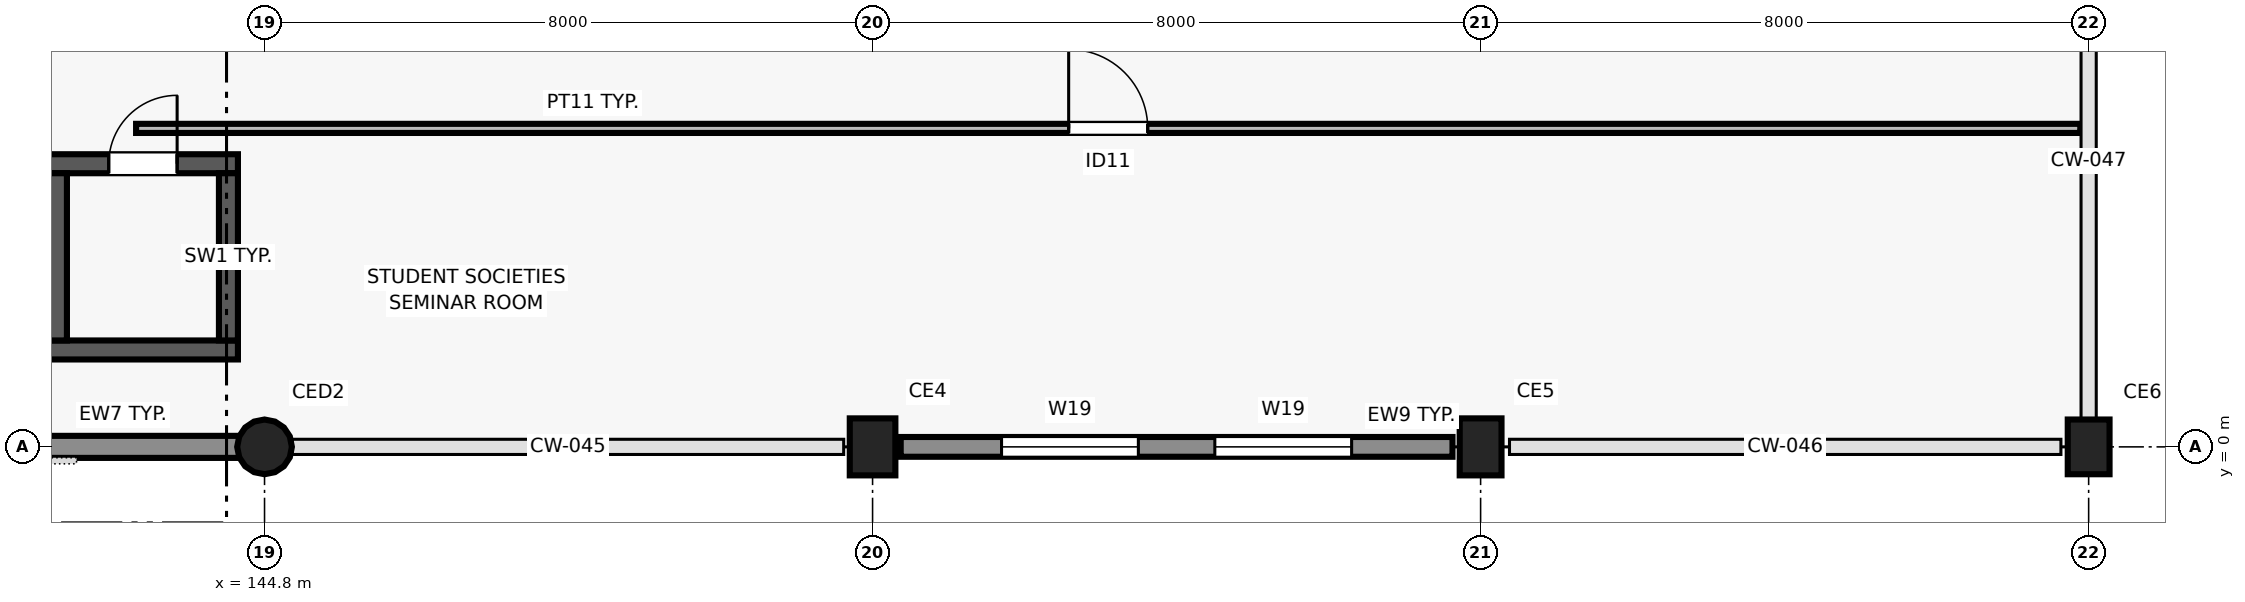
"""IFC4 building model, lengths in metres.
Left out: names, types, materials, properties, quantities, classifications, styles, units other than length and angle.
Written with IfcOpenShell. Run it as: python <this file> out.ifc"""

import sys

from ifc_helpers import new_model, si_unit, direction, frame, frame_2d, origin, origin_2d, place, context, subcontext, project, spatial, rectangle, circle, extrude, element, fill, save


model = new_model("IFC4")
c1 = context("Model", 3, precision=1e-05, world=origin(), true_north=direction((0.0, 1.0)))
c2 = subcontext(c1, "Body", "Model", "MODEL_VIEW")
j1 = project(units=[si_unit("LENGTHUNIT", "METRE"), si_unit("PLANEANGLEUNIT", "RADIAN")], contexts=[c1])
p1 = place(None, origin())
s1 = spatial("IfcSite", under=j1, at=p1, CompositionType="ELEMENT")
p2 = place(p1, origin())
s2 = spatial("IfcBuilding", under=s1, at=p2, CompositionType="ELEMENT")
p3 = place(p2, frame((0.0, 0.0, 4.5)))
s3 = spatial("IfcBuildingStorey", under=s2, at=p3, CompositionType="ELEMENT", Elevation=4.5)
p4 = place(p3, frame((144.8, 0.0, 0.0), z_axis=(0.0, 0.0, 1.0), x_axis=(1.0, 0.0, 0.0)))
e1 = element("IfcColumn", 1, at=p4, inside=s3, PredefinedType="COLUMN", context=c2, shape_type="SweptSolid", body=[
    extrude(circle(Radius=0.36, at=origin_2d()), origin(), (0.0, 0.0, 1.0), 4.5),
])
p5 = place(p3, frame((152.8, 0.0, 0.0), z_axis=(0.0, 0.0, 1.0), x_axis=(1.0, 0.0, 0.0)))
e2 = element("IfcColumn", 2, at=p5, inside=s3, PredefinedType="COLUMN", context=c2, shape_type="SweptSolid", body=[
    extrude(rectangle(XDim=0.75, YDim=0.6, at=origin_2d()), origin(), (0.0, 0.0, 1.0), 4.5),
])
p6 = place(p3, frame((160.8, 0.0, 0.0), z_axis=(0.0, 0.0, 1.0), x_axis=(1.0, 0.0, 0.0)))
e3 = element("IfcColumn", 3, at=p6, inside=s3, PredefinedType="COLUMN", context=c2, shape_type="SweptSolid", body=[
    extrude(rectangle(XDim=0.75, YDim=0.55, at=origin_2d()), origin(), (0.0, 0.0, 1.0), 4.5),
])
p7 = place(p3, frame((168.8, 0.0, 0.0), z_axis=(0.0, 0.0, 1.0), x_axis=(1.0, 0.0, 0.0)))
e4 = element("IfcColumn", 4, at=p7, inside=s3, PredefinedType="COLUMN", context=c2, shape_type="SweptSolid", body=[
    extrude(rectangle(XDim=0.72, YDim=0.55, at=origin_2d()), origin(), (0.0, 0.0, 1.0), 4.5),
])
p8 = place(p3, frame((137.155, 0.0, 0.0), z_axis=(0.0, 0.0, 1.0), x_axis=(1.0, 0.0, 0.0)))
e5 = element("IfcWall", 5, at=p8, inside=s3, PredefinedType="SOLIDWALL", context=c2, shape_type="SweptSolid", body=[
    extrude(rectangle(XDim=7.343, YDim=0.29, at=frame_2d((3.671, 0.0))), origin(), (0.0, 0.0, 1.0), 4.22),
])
p9 = place(p8, frame((1.872, 0.0, 0.9)))
e6 = element("IfcOpeningElement", 6, at=p9, cuts=e5, PredefinedType="OPENING", context=c2, shape_type="SweptSolid", body=[
    extrude(rectangle(XDim=2.1, YDim=1.25, at=frame_2d((1.05, 0.625))), frame((0.0, 0.155, 0.0), z_axis=(0.0, -1.0, 0.0), x_axis=(1.0, 0.0, 0.0)), (0.0, 0.0, 1.0), 0.31),
])
p10 = place(p3, frame((153.17, 0.0, 0.0), z_axis=(0.0, 0.0, 1.0), x_axis=(1.0, 0.0, 0.0)))
e7 = element("IfcWall", 7, at=p10, inside=s3, PredefinedType="SOLIDWALL", context=c2, shape_type="SweptSolid", body=[
    extrude(rectangle(XDim=7.26, YDim=0.26, at=frame_2d((3.63, 0.0))), origin(), (0.0, 0.0, 1.0), 3.62),
])
p11 = place(p10, frame((1.327, 0.0, 0.9)))
e8 = element("IfcOpeningElement", 8, at=p11, cuts=e7, PredefinedType="OPENING", context=c2, shape_type="SweptSolid", body=[
    extrude(rectangle(XDim=1.8, YDim=1.25, at=frame_2d((0.9, 0.625))), frame((0.0, 0.14, 0.0), z_axis=(0.0, -1.0, 0.0), x_axis=(1.0, 0.0, 0.0)), (0.0, 0.0, 1.0), 0.28),
])
p12 = place(p10, frame((4.133, 0.0, 0.9)))
e9 = element("IfcOpeningElement", 9, at=p12, cuts=e7, PredefinedType="OPENING", context=c2, shape_type="SweptSolid", body=[
    extrude(rectangle(XDim=1.8, YDim=1.25, at=frame_2d((0.9, 0.625))), frame((0.0, 0.14, 0.0), z_axis=(0.0, -1.0, 0.0), x_axis=(1.0, 0.0, 0.0)), (0.0, 0.0, 1.0), 0.28),
])
p13 = place(p3, frame((141.95, 1.275, 0.0), z_axis=(0.0, 0.0, 1.0), x_axis=(1.0, 0.0, 0.0)))
e10 = element("IfcWall", 10, at=p13, inside=s3, PredefinedType="SHEAR", context=c2, shape_type="SweptSolid", body=[
    extrude(rectangle(XDim=2.5, YDim=0.25, at=frame_2d((1.25, 0.0))), origin(), (0.0, 0.0, 1.0), 4.22),
])
p14 = place(p3, frame((141.95, 3.725, 0.0), z_axis=(0.0, 0.0, 1.0), x_axis=(1.0, 0.0, 0.0)))
e11 = element("IfcWall", 11, at=p14, inside=s3, PredefinedType="SHEAR", context=c2, shape_type="SweptSolid", body=[
    extrude(rectangle(XDim=2.5, YDim=0.25, at=frame_2d((1.25, 0.0))), origin(), (0.0, 0.0, 1.0), 4.22),
])
p15 = place(p14, frame((0.8, 0.0, 0.0)))
e12 = element("IfcOpeningElement", 12, at=p15, cuts=e11, PredefinedType="OPENING", context=c2, shape_type="SweptSolid", body=[
    extrude(rectangle(XDim=0.9, YDim=2.05, at=frame_2d((0.45, 1.025))), frame((0.0, 0.135, 0.0), z_axis=(0.0, -1.0, 0.0), x_axis=(1.0, 0.0, 0.0)), (0.0, 0.0, 1.0), 0.27),
])
for number, where, z_axis, x_axis in (
    (13, (142.075, 1.4, 0.0), (0.0, 0.0, 1.0), (0.0, 1.0, 0.0)),
    (14, (144.325, 1.4, 0.0), (0.0, 0.0, 1.0), (0.0, 1.0, 0.0)),
):
    element("IfcWall", number, at=place(p3, frame(where, z_axis=z_axis, x_axis=x_axis)), inside=s3, PredefinedType="SHEAR", context=c2, shape_type="SweptSolid", body=[
        extrude(rectangle(XDim=2.2, YDim=0.25, at=frame_2d((1.1, 0.0))), origin(), (0.0, 0.0, 1.0), 4.22),
    ])
p16 = place(p3, frame((143.11, 4.19, 0.0), z_axis=(0.0, 0.0, 1.0), x_axis=(1.0, 0.0, 0.0)))
e15 = element("IfcWall", 15, at=p16, inside=s3, PredefinedType="PARTITIONING", context=c2, shape_type="SweptSolid", body=[
    extrude(rectangle(XDim=25.58, YDim=0.12, at=frame_2d((12.79, 0.0))), origin(), (0.0, 0.0, 1.0), 4.2),
])
p17 = place(p16, frame((12.27, 0.0, 0.0)))
e16 = element("IfcOpeningElement", 16, at=p17, cuts=e15, PredefinedType="OPENING", context=c2, shape_type="SweptSolid", body=[
    extrude(rectangle(XDim=1.04, YDim=2.15, at=frame_2d((0.52, 1.075))), frame((0.0, 0.07, 0.0), z_axis=(0.0, -1.0, 0.0), x_axis=(1.0, 0.0, 0.0)), (0.0, 0.0, 1.0), 0.14),
])
p18 = place(p11, origin())
e17 = element("IfcWindow", 17, at=p18, inside=s3, PartitioningType="SINGLE_PANEL", PredefinedType="WINDOW", context=c2, shape_type="SweptSolid", body=[
    extrude(rectangle(XDim=1.8, YDim=1.25, at=frame_2d((0.9, 0.625))), frame((0.0, 0.03, 0.0), z_axis=(0.0, -1.0, 0.0), x_axis=(1.0, 0.0, 0.0)), (0.0, 0.0, 1.0), 0.06),
])
fill(e8, e17)
p19 = place(p12, origin())
e18 = element("IfcWindow", 18, at=p19, inside=s3, PartitioningType="SINGLE_PANEL", PredefinedType="WINDOW", context=c2, shape_type="SweptSolid", body=[
    extrude(rectangle(XDim=1.8, YDim=1.25, at=frame_2d((0.9, 0.625))), frame((0.0, 0.03, 0.0), z_axis=(0.0, -1.0, 0.0), x_axis=(1.0, 0.0, 0.0)), (0.0, 0.0, 1.0), 0.06),
])
fill(e9, e18)
p20 = place(p15, origin())
e19 = element("IfcDoor", 19, at=p20, inside=s3, OperationType="SINGLE_SWING_RIGHT", PredefinedType="DOOR", context=c2, shape_type="SweptSolid", body=[
    extrude(rectangle(XDim=0.9, YDim=2.05, at=frame_2d((0.45, 1.025))), frame((0.0, 0.025, 0.0), z_axis=(0.0, -1.0, 0.0), x_axis=(1.0, 0.0, 0.0)), (0.0, 0.0, 1.0), 0.05),
])
fill(e12, e19)
p21 = place(p17, origin())
e20 = element("IfcDoor", 20, at=p21, inside=s3, OperationType="SINGLE_SWING_LEFT", PredefinedType="DOOR", context=c2, shape_type="SweptSolid", body=[
    extrude(rectangle(XDim=1.04, YDim=2.15, at=frame_2d((0.52, 1.075))), frame((0.0, 0.025, 0.0), z_axis=(0.0, -1.0, 0.0), x_axis=(1.0, 0.0, 0.0)), (0.0, 0.0, 1.0), 0.05),
])
fill(e16, e20)
save(model, sys.argv[1])
